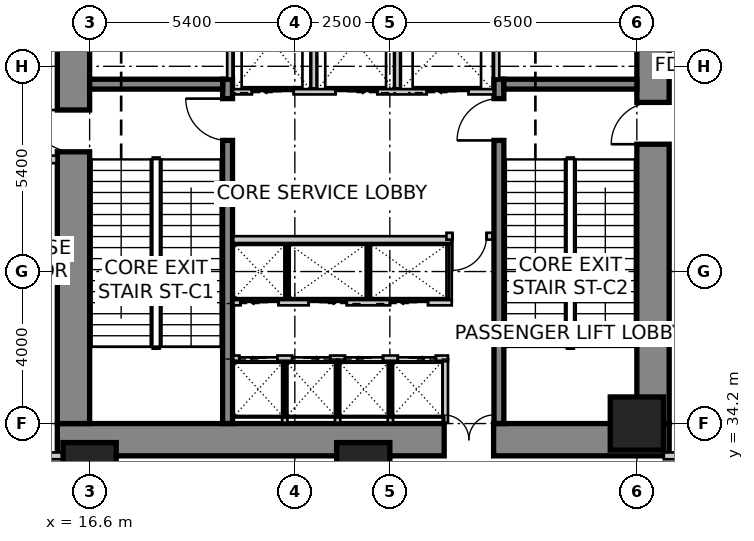
"""IFC4 building model, lengths in metres.
Left out: names, types, materials, properties, quantities, classifications, styles, units other than length and angle.
Written with IfcOpenShell. Run it as: python <this file> out.ifc"""

import sys

from ifc_helpers import new_model, si_unit, direction, frame, frame_2d, origin, origin_2d, place, context, subcontext, project, spatial, rectangle, extrude, source, transform, mapped, element, fill, save


model = new_model("IFC4")
c1 = context("Model", 3, precision=1e-05, world=origin(), true_north=direction((0.0, 1.0)))
c2 = subcontext(c1, "Body", "Model", "MODEL_VIEW")
j1 = project(units=[si_unit("LENGTHUNIT", "METRE"), si_unit("PLANEANGLEUNIT", "RADIAN")], contexts=[c1])
p1 = place(None, origin())
s1 = spatial("IfcSite", under=j1, at=p1, CompositionType="ELEMENT")
p2 = place(p1, origin())
s2 = spatial("IfcBuilding", under=s1, at=p2, CompositionType="ELEMENT")
p3 = place(p2, origin())
s3 = spatial("IfcBuildingStorey", under=s2, at=p3, CompositionType="ELEMENT", Elevation=0.0)
p4 = place(p3, frame((15.75, 33.775, 0.0), z_axis=(0.0, 0.0, 1.0), x_axis=(1.0, 0.0, 0.0)))
e1 = element("IfcWall", 1, at=p4, inside=s3, PredefinedType="SHEAR", context=c2, shape_type="SweptSolid", body=[
    extrude(rectangle(XDim=16.1, YDim=0.85, at=frame_2d((8.05, 0.0))), origin(), (0.0, 0.0, 1.0), 6.0),
])
m1 = source(origin(), c2, "Body", "SweptSolid", [
    extrude(rectangle(XDim=1.3, YDim=2.15, at=frame_2d((0.65, 1.075))), frame((0.0, 0.435, 0.0), z_axis=(0.0, -1.0, 0.0), x_axis=(1.0, 0.0, 0.0)), (0.0, 0.0, 1.0), 0.87),
])
p5 = place(p4, frame((10.18, 0.0, 0.0)))
e2 = element("IfcOpeningElement", 2, at=p5, cuts=e1, PredefinedType="OPENING", context=c2, shape_type="MappedRepresentation", body=[
    mapped(m1, transform((0.0, 0.0, 0.0), scale=1.0)),
])
p6 = place(p3, frame((16.175, 34.2, 0.0), z_axis=(0.0, 0.0, 1.0), x_axis=(0.0, 1.0, 0.0)))
e3 = element("IfcWall", 3, at=p6, inside=s3, PredefinedType="SHEAR", context=c2, shape_type="SweptSolid", body=[
    extrude(rectangle(XDim=11.4, YDim=0.85, at=frame_2d((5.7, 0.0))), origin(), (0.0, 0.0, 1.0), 6.0),
])
m2 = source(origin(), c2, "Body", "SweptSolid", [
    extrude(rectangle(XDim=1.1, YDim=2.15, at=frame_2d((0.55, 1.075))), frame((0.0, 0.435, 0.0), z_axis=(0.0, -1.0, 0.0), x_axis=(1.0, 0.0, 0.0)), (0.0, 0.0, 1.0), 0.87),
])
p7 = place(p6, frame((7.15, 0.0, 0.0)))
e4 = element("IfcOpeningElement", 4, at=p7, cuts=e3, PredefinedType="OPENING", context=c2, shape_type="MappedRepresentation", body=[
    mapped(m2, transform((0.0, 0.0, 0.0), scale=1.0)),
])
p8 = place(p3, frame((31.425, 34.2, 0.0), z_axis=(0.0, 0.0, 1.0), x_axis=(0.0, 1.0, 0.0)))
e5 = element("IfcWall", 5, at=p8, inside=s3, PredefinedType="SHEAR", context=c2, shape_type="SweptSolid", body=[
    extrude(rectangle(XDim=11.4, YDim=0.85, at=frame_2d((5.7, 0.0))), origin(), (0.0, 0.0, 1.0), 6.0),
])
p9 = place(p8, frame((7.35, 0.0, 0.0)))
e6 = element("IfcOpeningElement", 6, at=p9, cuts=e5, PredefinedType="OPENING", context=c2, shape_type="MappedRepresentation", body=[
    mapped(m2, transform((0.0, 0.0, 0.0), scale=1.0)),
])
p10 = place(p3, frame((20.23, 34.2, 0.0), z_axis=(0.0, 0.0, 1.0), x_axis=(0.0, 1.0, 0.0)))
e7 = element("IfcWall", 7, at=p10, inside=s3, PredefinedType="SHEAR", context=c2, shape_type="SweptSolid", body=[
    extrude(rectangle(XDim=9.06, YDim=0.26, at=frame_2d((4.53, 0.0))), origin(), (0.0, 0.0, 1.0), 6.0),
])
m3 = source(origin(), c2, "Body", "SweptSolid", [
    extrude(rectangle(XDim=1.1, YDim=2.15, at=frame_2d((0.55, 1.075))), frame((0.0, 0.14, 0.0), z_axis=(0.0, -1.0, 0.0), x_axis=(1.0, 0.0, 0.0)), (0.0, 0.0, 1.0), 0.28),
])
p11 = place(p10, frame((7.45, 0.0, 0.0)))
e8 = element("IfcOpeningElement", 8, at=p11, cuts=e7, PredefinedType="OPENING", context=c2, shape_type="MappedRepresentation", body=[
    mapped(m3, transform((0.0, 0.0, 0.0), scale=1.0)),
])
p12 = place(p3, frame((27.37, 34.2, 0.0), z_axis=(0.0, 0.0, 1.0), x_axis=(0.0, 1.0, 0.0)))
e9 = element("IfcWall", 9, at=p12, inside=s3, PredefinedType="SHEAR", context=c2, shape_type="SweptSolid", body=[
    extrude(rectangle(XDim=9.06, YDim=0.26, at=frame_2d((4.53, 0.0))), origin(), (0.0, 0.0, 1.0), 6.0),
])
p13 = place(p12, frame((7.45, 0.0, 0.0)))
e10 = element("IfcOpeningElement", 10, at=p13, cuts=e9, PredefinedType="OPENING", context=c2, shape_type="MappedRepresentation", body=[
    mapped(m3, transform((0.0, 0.0, 0.0), scale=1.0)),
])
for number, where, z_axis, x_axis in (
    (11, (16.6, 43.13, 0.0), (0.0, 0.0, 1.0), (1.0, 0.0, 0.0)),
    (12, (27.5, 43.13, 0.0), (0.0, 0.0, 1.0), (1.0, 0.0, 0.0)),
):
    element("IfcWall", number, at=place(p3, frame(where, z_axis=z_axis, x_axis=x_axis)), inside=s3, PredefinedType="SHEAR", context=c2, shape_type="SweptSolid", body=[
        extrude(rectangle(XDim=3.5, YDim=0.26, at=frame_2d((1.75, 0.0))), origin(), (0.0, 0.0, 1.0), 6.0),
    ])
m4 = source(origin(), c2, "Body", "SweptSolid", [
    extrude(rectangle(XDim=1.4, YDim=1.4, at=origin_2d()), origin(), (0.0, 0.0, 1.0), 6.0),
])
for number, where, z_axis, x_axis in (
    (13, (16.6, 33.0, 0.0), (0.0, 0.0, 1.0), (1.0, 0.0, 0.0)),
    (14, (23.8, 33.0, 0.0), (0.0, 0.0, 1.0), (1.0, 0.0, 0.0)),
    (15, (31.0, 34.2, 0.0), (0.0, 0.0, 1.0), (1.0, 0.0, 0.0)),
):
    element("IfcColumn", number, at=place(p3, frame(where, z_axis=z_axis, x_axis=x_axis)), inside=s3, PredefinedType="COLUMN", context=c2, shape_type="MappedRepresentation", body=[
        mapped(m4, transform((0.0, 0.0, 0.0), scale=1.0)),
    ])
p14 = place(p3, frame((20.37, 42.93, 0.0), z_axis=(0.0, 0.0, 1.0), x_axis=(1.0, 0.0, 0.0)))
e16 = element("IfcWall", 16, at=p14, inside=s3, PredefinedType="SOLIDWALL", context=c2, shape_type="SweptSolid", body=[
    extrude(rectangle(XDim=6.86, YDim=0.14, at=frame_2d((3.43, 0.0))), origin(), (0.0, 0.0, 1.0), 5.7),
])
m5 = source(origin(), c2, "Body", "SweptSolid", [
    extrude(rectangle(XDim=1.1, YDim=2.15, at=frame_2d((0.55, 1.075))), frame((0.0, 0.08, 0.0), z_axis=(0.0, -1.0, 0.0), x_axis=(1.0, 0.0, 0.0)), (0.0, 0.0, 1.0), 0.16),
])
p15 = place(p14, frame((0.5, 0.0, 0.0)))
e17 = element("IfcOpeningElement", 17, at=p15, cuts=e16, PredefinedType="OPENING", context=c2, shape_type="MappedRepresentation", body=[
    mapped(m5, transform((0.0, 0.0, 0.0), scale=1.0)),
])
p16 = place(p14, frame((2.7, 0.0, 0.0)))
e18 = element("IfcOpeningElement", 18, at=p16, cuts=e16, PredefinedType="OPENING", context=c2, shape_type="MappedRepresentation", body=[
    mapped(m5, transform((0.0, 0.0, 0.0), scale=1.0)),
])
p17 = place(p14, frame((5.1, 0.0, 0.0)))
e19 = element("IfcOpeningElement", 19, at=p17, cuts=e16, PredefinedType="OPENING", context=c2, shape_type="MappedRepresentation", body=[
    mapped(m5, transform((0.0, 0.0, 0.0), scale=1.0)),
])
for number, where, z_axis, x_axis in (
    (20, (20.29, 43.28, 0.0), (0.0, 0.0, 1.0), (0.0, 1.0, 0.0)),
    (21, (27.31, 43.28, 0.0), (0.0, 0.0, 1.0), (0.0, 1.0, 0.0)),
):
    element("IfcWall", number, at=place(p3, frame(where, z_axis=z_axis, x_axis=x_axis)), inside=s3, PredefinedType="SOLIDWALL", context=c2, shape_type="SweptSolid", body=[
        extrude(rectangle(XDim=2.3, YDim=0.14, at=frame_2d((1.15, 0.0))), origin(), (0.0, 0.0, 1.0), 5.7),
    ])
for number, where, z_axis, x_axis in (
    (22, (22.5, 43.02, 0.0), (0.0, 0.0, 1.0), (0.0, 1.0, 0.0)),
    (23, (24.7, 43.02, 0.0), (0.0, 0.0, 1.0), (0.0, 1.0, 0.0)),
):
    element("IfcWall", number, at=place(p3, frame(where, z_axis=z_axis, x_axis=x_axis)), inside=s3, PredefinedType="SOLIDWALL", context=c2, shape_type="SweptSolid", body=[
        extrude(rectangle(XDim=2.56, YDim=0.14, at=frame_2d((1.28, 0.0))), origin(), (0.0, 0.0, 1.0), 5.7),
    ])
p18 = place(p3, frame((20.38, 35.92, 0.0), z_axis=(0.0, 0.0, 1.0), x_axis=(1.0, 0.0, 0.0)))
e24 = element("IfcWall", 24, at=p18, inside=s3, PredefinedType="SOLIDWALL", context=c2, shape_type="SweptSolid", body=[
    extrude(rectangle(XDim=5.65, YDim=0.14, at=frame_2d((2.825, 0.0))), origin(), (0.0, 0.0, 1.0), 5.7),
])
m6 = source(origin(), c2, "Body", "SweptSolid", [
    extrude(rectangle(XDim=1.0, YDim=2.15, at=frame_2d((0.5, 1.075))), frame((0.0, 0.08, 0.0), z_axis=(0.0, -1.0, 0.0), x_axis=(1.0, 0.0, 0.0)), (0.0, 0.0, 1.0), 0.16),
])
p19 = place(p18, frame((0.16, 0.0, 0.0)))
e25 = element("IfcOpeningElement", 25, at=p19, cuts=e24, PredefinedType="OPENING", context=c2, shape_type="MappedRepresentation", body=[
    mapped(m6, transform((0.0, 0.0, 0.0), scale=1.0)),
])
p20 = place(p18, frame((1.55, 0.0, 0.0)))
e26 = element("IfcOpeningElement", 26, at=p20, cuts=e24, PredefinedType="OPENING", context=c2, shape_type="MappedRepresentation", body=[
    mapped(m6, transform((0.0, 0.0, 0.0), scale=1.0)),
])
p21 = place(p18, frame((2.94, 0.0, 0.0)))
e27 = element("IfcOpeningElement", 27, at=p21, cuts=e24, PredefinedType="OPENING", context=c2, shape_type="MappedRepresentation", body=[
    mapped(m6, transform((0.0, 0.0, 0.0), scale=1.0)),
])
p22 = place(p18, frame((4.33, 0.0, 0.0)))
e28 = element("IfcOpeningElement", 28, at=p22, cuts=e24, PredefinedType="OPENING", context=c2, shape_type="MappedRepresentation", body=[
    mapped(m6, transform((0.0, 0.0, 0.0), scale=1.0)),
])
for number, where, z_axis, x_axis in (
    (29, (25.96, 34.22, 0.0), (0.0, 0.0, 1.0), (0.0, 1.0, 0.0)),
    (30, (21.735, 34.22, 0.0), (0.0, 0.0, 1.0), (0.0, 1.0, 0.0)),
    (31, (23.125, 34.22, 0.0), (0.0, 0.0, 1.0), (0.0, 1.0, 0.0)),
    (32, (24.515, 34.22, 0.0), (0.0, 0.0, 1.0), (0.0, 1.0, 0.0)),
):
    element("IfcWall", number, at=place(p3, frame(where, z_axis=z_axis, x_axis=x_axis)), inside=s3, PredefinedType="SOLIDWALL", context=c2, shape_type="SweptSolid", body=[
        extrude(rectangle(XDim=1.62, YDim=0.14, at=frame_2d((0.81, 0.0))), origin(), (0.0, 0.0, 1.0), 5.7),
    ])
p23 = place(p3, frame((20.38, 37.38, 0.0), z_axis=(0.0, 0.0, 1.0), x_axis=(1.0, 0.0, 0.0)))
e33 = element("IfcWall", 33, at=p23, inside=s3, PredefinedType="SOLIDWALL", context=c2, shape_type="SweptSolid", body=[
    extrude(rectangle(XDim=5.75, YDim=0.14, at=frame_2d((2.875, 0.0))), origin(), (0.0, 0.0, 1.0), 5.7),
])
p24 = place(p23, frame((0.19, 0.0, 0.0)))
e34 = element("IfcOpeningElement", 34, at=p24, cuts=e33, PredefinedType="OPENING", context=c2, shape_type="MappedRepresentation", body=[
    mapped(m6, transform((0.0, 0.0, 0.0), scale=1.0)),
])
p25 = place(p23, frame((1.985, 0.0, 0.0)))
e35 = element("IfcOpeningElement", 35, at=p25, cuts=e33, PredefinedType="OPENING", context=c2, shape_type="MappedRepresentation", body=[
    mapped(m6, transform((0.0, 0.0, 0.0), scale=1.0)),
])
p26 = place(p23, frame((4.125, 0.0, 0.0)))
e36 = element("IfcOpeningElement", 36, at=p26, cuts=e33, PredefinedType="OPENING", context=c2, shape_type="MappedRepresentation", body=[
    mapped(m6, transform((0.0, 0.0, 0.0), scale=1.0)),
])
p27 = place(p3, frame((20.38, 39.04, 0.0), z_axis=(0.0, 0.0, 1.0), x_axis=(1.0, 0.0, 0.0)))
e37 = element("IfcWall", 37, at=p27, inside=s3, PredefinedType="SOLIDWALL", context=c2, shape_type="SweptSolid", body=[
    extrude(rectangle(XDim=5.75, YDim=0.18, at=frame_2d((2.875, 0.0))), origin(), (0.0, 0.0, 1.0), 5.7),
])
for number, where, z_axis, x_axis in (
    (38, (26.06, 37.46, 0.0), (0.0, 0.0, 1.0), (0.0, 1.0, 0.0)),
    (39, (21.795, 37.46, 0.0), (0.0, 0.0, 1.0), (0.0, 1.0, 0.0)),
    (40, (23.935, 37.46, 0.0), (0.0, 0.0, 1.0), (0.0, 1.0, 0.0)),
):
    element("IfcWall", number, at=place(p3, frame(where, z_axis=z_axis, x_axis=x_axis)), inside=s3, PredefinedType="SOLIDWALL", context=c2, shape_type="SweptSolid", body=[
        extrude(rectangle(XDim=1.48, YDim=0.14, at=frame_2d((0.74, 0.0))), origin(), (0.0, 0.0, 1.0), 5.7),
    ])
p28 = place(p3, frame((27.2, 39.13, 0.0), z_axis=(0.0, 0.0, 1.0), x_axis=(-1.0, 0.0, 0.0)))
e41 = element("IfcWall", 41, at=p28, inside=s3, PredefinedType="PARTITIONING", context=c2, shape_type="SweptSolid", body=[
    extrude(rectangle(XDim=1.21, YDim=0.18, at=frame_2d((0.605, 0.0))), origin(), (0.0, 0.0, 1.0), 5.7),
])
m7 = source(origin(), c2, "Body", "SweptSolid", [
    extrude(rectangle(XDim=0.9, YDim=2.15, at=frame_2d((0.45, 1.075))), frame((0.0, 0.1, 0.0), z_axis=(0.0, -1.0, 0.0), x_axis=(1.0, 0.0, 0.0)), (0.0, 0.0, 1.0), 0.2),
])
p29 = place(p28, frame((0.155, 0.0, 0.0)))
e42 = element("IfcOpeningElement", 42, at=p29, cuts=e41, PredefinedType="OPENING", context=c2, shape_type="MappedRepresentation", body=[
    mapped(m7, transform((0.0, 0.0, 0.0), scale=1.0)),
])
p30 = place(p3, frame((15.73, 41.15, 0.0), z_axis=(0.0, 0.0, 1.0), x_axis=(-1.0, 0.0, 0.0)))
e43 = element("IfcWall", 43, at=p30, inside=s3, PredefinedType="SOLIDWALL", context=c2, shape_type="SweptSolid", body=[
    extrude(rectangle(XDim=1.55, YDim=0.2, at=frame_2d((0.775, 0.0))), origin(), (0.0, 0.0, 1.0), 5.7),
])
p31 = place(p3, frame((31.71, 33.35, 0.0), z_axis=(0.0, 0.0, 1.0), x_axis=(1.0, 0.0, 0.0)))
e44 = element("IfcWall", 44, at=p31, inside=s3, PredefinedType="PARTITIONING", context=c2, shape_type="SweptSolid", body=[
    extrude(rectangle(XDim=20.424, YDim=0.18, at=frame_2d((10.212, 0.0))), origin(), (0.0, 0.0, 1.0), 3.892),
])
m8 = source(origin(), c2, "Body", "SweptSolid", [
    extrude(rectangle(XDim=1.6, YDim=2.15, at=frame_2d((0.8, 1.075))), frame((0.0, 0.1, 0.0), z_axis=(0.0, -1.0, 0.0), x_axis=(1.0, 0.0, 0.0)), (0.0, 0.0, 1.0), 0.2),
])
p32 = place(p31, frame((9.412, 0.0, 0.0)))
e45 = element("IfcOpeningElement", 45, at=p32, cuts=e44, PredefinedType="OPENING", context=c2, shape_type="MappedRepresentation", body=[
    mapped(m8, transform((0.0, 0.0, 0.0), scale=1.0)),
])
p33 = place(p3, frame((11.44, 33.35, 0.0), z_axis=(0.0, 0.0, 1.0), x_axis=(1.0, 0.0, 0.0)))
e46 = element("IfcWall", 46, at=p33, inside=s3, PredefinedType="PARTITIONING", context=c2, shape_type="SweptSolid", body=[
    extrude(rectangle(XDim=4.45, YDim=0.18, at=frame_2d((2.225, 0.0))), origin(), (0.0, 0.0, 1.0), 4.492),
])
m9 = source(origin(), c2, "Body", "SweptSolid", [
    extrude(rectangle(XDim=1.4, YDim=2.15, at=frame_2d((0.7, 1.075))), frame((0.0, 0.1, 0.0), z_axis=(0.0, -1.0, 0.0), x_axis=(1.0, 0.0, 0.0)), (0.0, 0.0, 1.0), 0.2),
])
p34 = place(p33, frame((1.525, 0.0, 0.0)))
e47 = element("IfcOpeningElement", 47, at=p34, cuts=e46, PredefinedType="OPENING", context=c2, shape_type="MappedRepresentation", body=[
    mapped(m9, transform((0.0, 0.0, 0.0), scale=1.0)),
])
m10 = source(origin(), c2, "Body", "SweptSolid", [
    extrude(rectangle(XDim=1.1, YDim=2.15, at=frame_2d((0.55, 1.075))), frame((0.0, 0.025, 0.0), z_axis=(0.0, -1.0, 0.0), x_axis=(1.0, 0.0, 0.0)), (0.0, 0.0, 1.0), 0.05),
])
p35 = place(p15, origin())
e48 = element("IfcDoor", 48, at=p35, inside=s3, OperationType="SLIDING_TO_LEFT", PredefinedType="DOOR", context=c2, shape_type="MappedRepresentation", body=[
    mapped(m10, transform((0.0, 0.0, 0.0), scale=1.0)),
])
fill(e17, e48)
p36 = place(p16, origin())
e49 = element("IfcDoor", 49, at=p36, inside=s3, OperationType="SLIDING_TO_RIGHT", PredefinedType="DOOR", context=c2, shape_type="MappedRepresentation", body=[
    mapped(m10, transform((0.0, 0.0, 0.0), scale=1.0)),
])
fill(e18, e49)
m11 = source(origin(), c2, "Body", "SweptSolid", [
    extrude(rectangle(XDim=1.1, YDim=2.15, at=frame_2d((0.55, 1.075))), frame((0.0, 0.025, 0.0), z_axis=(0.0, -1.0, 0.0), x_axis=(1.0, 0.0, 0.0)), (0.0, 0.0, 1.0), 0.05),
])
p37 = place(p17, origin())
e50 = element("IfcDoor", 50, at=p37, inside=s3, OperationType="SLIDING_TO_LEFT", PredefinedType="DOOR", context=c2, shape_type="MappedRepresentation", body=[
    mapped(m11, transform((0.0, 0.0, 0.0), scale=1.0)),
])
fill(e19, e50)
m12 = source(origin(), c2, "Body", "SweptSolid", [
    extrude(rectangle(XDim=1.0, YDim=2.15, at=frame_2d((0.5, 1.075))), frame((0.0, 0.025, 0.0), z_axis=(0.0, -1.0, 0.0), x_axis=(1.0, 0.0, 0.0)), (0.0, 0.0, 1.0), 0.05),
])
p38 = place(p19, origin())
e51 = element("IfcDoor", 51, at=p38, inside=s3, OperationType="SLIDING_TO_LEFT", PredefinedType="DOOR", context=c2, shape_type="MappedRepresentation", body=[
    mapped(m12, transform((0.0, 0.0, 0.0), scale=1.0)),
])
fill(e25, e51)
p39 = place(p20, origin())
e52 = element("IfcDoor", 52, at=p39, inside=s3, OperationType="SLIDING_TO_RIGHT", PredefinedType="DOOR", context=c2, shape_type="MappedRepresentation", body=[
    mapped(m12, transform((0.0, 0.0, 0.0), scale=1.0)),
])
fill(e26, e52)
p40 = place(p21, origin())
e53 = element("IfcDoor", 53, at=p40, inside=s3, OperationType="SLIDING_TO_LEFT", PredefinedType="DOOR", context=c2, shape_type="MappedRepresentation", body=[
    mapped(m12, transform((0.0, 0.0, 0.0), scale=1.0)),
])
fill(e27, e53)
p41 = place(p22, origin())
e54 = element("IfcDoor", 54, at=p41, inside=s3, OperationType="SLIDING_TO_RIGHT", PredefinedType="DOOR", context=c2, shape_type="MappedRepresentation", body=[
    mapped(m12, transform((0.0, 0.0, 0.0), scale=1.0)),
])
fill(e28, e54)
p42 = place(p24, origin())
e55 = element("IfcDoor", 55, at=p42, inside=s3, OperationType="SLIDING_TO_LEFT", PredefinedType="DOOR", context=c2, shape_type="MappedRepresentation", body=[
    mapped(m12, transform((0.0, 0.0, 0.0), scale=1.0)),
])
fill(e34, e55)
p43 = place(p25, origin())
e56 = element("IfcDoor", 56, at=p43, inside=s3, OperationType="SLIDING_TO_RIGHT", PredefinedType="DOOR", context=c2, shape_type="MappedRepresentation", body=[
    mapped(m12, transform((0.0, 0.0, 0.0), scale=1.0)),
])
fill(e35, e56)
p44 = place(p26, origin())
e57 = element("IfcDoor", 57, at=p44, inside=s3, OperationType="SLIDING_TO_LEFT", PredefinedType="DOOR", context=c2, shape_type="MappedRepresentation", body=[
    mapped(m12, transform((0.0, 0.0, 0.0), scale=1.0)),
])
fill(e36, e57)
m13 = source(origin(), c2, "Body", "SweptSolid", [
    extrude(rectangle(XDim=1.1, YDim=2.15, at=frame_2d((0.55, 1.075))), frame((0.0, 0.025, 0.0), z_axis=(0.0, -1.0, 0.0), x_axis=(1.0, 0.0, 0.0)), (0.0, 0.0, 1.0), 0.05),
])
p45 = place(p11, origin())
e58 = element("IfcDoor", 58, at=p45, inside=s3, OperationType="SINGLE_SWING_RIGHT", PredefinedType="DOOR", context=c2, shape_type="MappedRepresentation", body=[
    mapped(m13, transform((0.0, 0.0, 0.0), scale=1.0)),
])
fill(e8, e58)
p46 = place(p13, origin())
e59 = element("IfcDoor", 59, at=p46, inside=s3, OperationType="SINGLE_SWING_LEFT", PredefinedType="DOOR", context=c2, shape_type="MappedRepresentation", body=[
    mapped(m13, transform((0.0, 0.0, 0.0), scale=1.0)),
])
fill(e10, e59)
p47 = place(p7, origin())
e60 = element("IfcDoor", 60, at=p47, inside=s3, OperationType="SINGLE_SWING_RIGHT", PredefinedType="DOOR", context=c2, shape_type="MappedRepresentation", body=[
    mapped(m13, transform((0.0, 0.0, 0.0), scale=1.0)),
])
fill(e4, e60)
p48 = place(p9, origin())
e61 = element("IfcDoor", 61, at=p48, inside=s3, OperationType="SINGLE_SWING_LEFT", PredefinedType="DOOR", context=c2, shape_type="MappedRepresentation", body=[
    mapped(m13, transform((0.0, 0.0, 0.0), scale=1.0)),
])
fill(e6, e61)
m14 = source(origin(), c2, "Body", "SweptSolid", [
    extrude(rectangle(XDim=1.3, YDim=2.15, at=frame_2d((0.65, 1.075))), frame((0.0, 0.025, 0.0), z_axis=(0.0, -1.0, 0.0), x_axis=(1.0, 0.0, 0.0)), (0.0, 0.0, 1.0), 0.05),
])
p49 = place(p5, origin())
e62 = element("IfcDoor", 62, at=p49, inside=s3, OperationType="DOUBLE_DOOR_SINGLE_SWING", PredefinedType="DOOR", context=c2, shape_type="MappedRepresentation", body=[
    mapped(m14, transform((0.0, 0.0, 0.0), scale=1.0)),
])
fill(e2, e62)
m15 = source(origin(), c2, "Body", "SweptSolid", [
    extrude(rectangle(XDim=0.9, YDim=2.15, at=frame_2d((0.45, 1.075))), frame((0.0, 0.025, 0.0), z_axis=(0.0, -1.0, 0.0), x_axis=(1.0, 0.0, 0.0)), (0.0, 0.0, 1.0), 0.05),
])
p50 = place(p29, origin())
e63 = element("IfcDoor", 63, at=p50, inside=s3, OperationType="SINGLE_SWING_RIGHT", PredefinedType="DOOR", context=c2, shape_type="MappedRepresentation", body=[
    mapped(m15, transform((0.0, 0.0, 0.0), scale=1.0)),
])
fill(e42, e63)
save(model, sys.argv[1])
